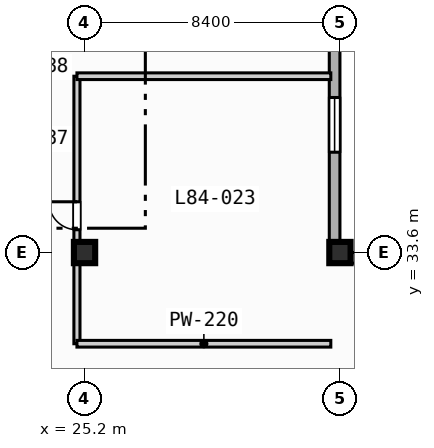
"""IFC4 building model, lengths in metres.
Left out: names, types, materials, properties, quantities, classifications, styles, units other than length and angle.
Written with IfcOpenShell. Run it as: python <this file> out.ifc"""

import sys

from ifc_helpers import new_model, si_unit, direction, frame, frame_2d, origin, origin_2d, place, context, subcontext, project, spatial, rectangle, extrude, element, fill, save


model = new_model("IFC4")
c1 = context("Model", 3, precision=1e-05, world=origin(), true_north=direction((0.0, 1.0)))
c2 = subcontext(c1, "Body", "Model", "MODEL_VIEW")
j1 = project(units=[si_unit("LENGTHUNIT", "METRE"), si_unit("PLANEANGLEUNIT", "RADIAN")], contexts=[c1])
p1 = place(None, origin())
s1 = spatial("IfcSite", under=j1, at=p1, CompositionType="ELEMENT")
p2 = place(p1, origin())
s2 = spatial("IfcBuilding", under=s1, at=p2, CompositionType="ELEMENT")
p3 = place(p2, frame((0.0, 0.0, 339.8)))
s3 = spatial("IfcBuildingStorey", under=s2, at=p3, CompositionType="ELEMENT", Elevation=339.8)
for number, where, z_axis, x_axis in (
    (1, (25.2, 33.6, 0.0), (0.0, 0.0, 1.0), (1.0, 0.0, 0.0)),
    (2, (33.6, 33.6, 0.0), (0.0, 0.0, 1.0), (1.0, 0.0, 0.0)),
):
    element("IfcColumn", number, at=place(p3, frame(where, z_axis=z_axis, x_axis=x_axis)), inside=s3, PredefinedType="COLUMN", context=c2, shape_type="SweptSolid", body=[
        extrude(rectangle(XDim=0.7, YDim=0.7, at=origin_2d()), origin(), (0.0, 0.0, 1.0), 3.9),
    ])
p4 = place(p3, frame((33.425, 72.425, 0.0), z_axis=(0.0, 0.0, 1.0), x_axis=(0.0, -1.0, 0.0)))
e3 = element("IfcWall", 3, at=p4, inside=s3, PredefinedType="STANDARD", context=c2, shape_type="SweptSolid", body=[
    extrude(rectangle(XDim=39.0, YDim=0.35, at=frame_2d((19.5, 0.0))), origin(), (0.0, 0.0, 1.0), 3.67),
])
p5 = place(p4, frame((33.725, 0.0, 0.85)))
e4 = element("IfcOpeningElement", 4, at=p5, cuts=e3, PredefinedType="OPENING", context=c2, shape_type="SweptSolid", body=[
    extrude(rectangle(XDim=1.8, YDim=1.8, at=frame_2d((0.9, 0.9))), frame((0.0, 0.185, 0.0), z_axis=(0.0, -1.0, 0.0), x_axis=(1.0, 0.0, 0.0)), (0.0, 0.0, 1.0), 0.37),
])
p6 = place(p4, frame((8.225, 0.0, 0.85)))
e5 = element("IfcOpeningElement", 5, at=p6, cuts=e3, PredefinedType="OPENING", context=c2, shape_type="SweptSolid", body=[
    extrude(rectangle(XDim=2.4, YDim=1.95, at=frame_2d((1.2, 0.975))), frame((0.0, 0.185, 0.0), z_axis=(0.0, -1.0, 0.0), x_axis=(1.0, 0.0, 0.0)), (0.0, 0.0, 1.0), 0.37),
])
p7 = place(p3, frame((33.425, 33.425, 0.0), z_axis=(0.0, 0.0, 1.0), x_axis=(1.0, 0.0, 0.0)))
e6 = element("IfcWall", 6, at=p7, inside=s3, PredefinedType="STANDARD", context=c2, shape_type="SweptSolid", body=[
    extrude(rectangle(XDim=30.6, YDim=0.35, at=frame_2d((15.3, 0.0))), origin(), (0.0, 0.0, 1.0), 3.67),
])
p8 = place(p7, frame((12.075, 0.0, 0.0)))
e7 = element("IfcOpeningElement", 7, at=p8, cuts=e6, PredefinedType="OPENING", context=c2, shape_type="SweptSolid", body=[
    extrude(rectangle(XDim=1.4, YDim=2.2, at=frame_2d((0.7, 1.1))), frame((0.0, 0.185, 0.0), z_axis=(0.0, -1.0, 0.0), x_axis=(1.0, 0.0, 0.0)), (0.0, 0.0, 1.0), 0.37),
])
p9 = place(p3, frame((24.95, 30.6, 0.0), z_axis=(0.0, 0.0, 1.0), x_axis=(0.0, 1.0, 0.0)))
e8 = element("IfcWall", 8, at=p9, inside=s3, PredefinedType="PARTITIONING", context=c2, shape_type="SweptSolid", body=[
    extrude(rectangle(XDim=8.8, YDim=0.2, at=frame_2d((4.4, 0.0))), origin(), (0.0, 0.0, 1.0), 3.07),
])
p10 = place(p9, frame((3.75, 0.0, 0.0)))
e9 = element("IfcOpeningElement", 9, at=p10, cuts=e8, PredefinedType="OPENING", context=c2, shape_type="SweptSolid", body=[
    extrude(rectangle(XDim=0.92, YDim=2.1, at=frame_2d((0.46, 1.05))), frame((0.0, 0.11, 0.0), z_axis=(0.0, -1.0, 0.0), x_axis=(1.0, 0.0, 0.0)), (0.0, 0.0, 1.0), 0.22),
])
for number, where, z_axis, x_axis in (
    (10, (24.95, 30.6, 0.0), (0.0, 0.0, 1.0), (1.0, 0.0, 0.0)),
    (11, (24.95, 39.4, 0.0), (0.0, 0.0, 1.0), (1.0, 0.0, 0.0)),
):
    element("IfcWall", number, at=place(p3, frame(where, z_axis=z_axis, x_axis=x_axis)), inside=s3, PredefinedType="PARTITIONING", context=c2, shape_type="SweptSolid", body=[
        extrude(rectangle(XDim=8.35, YDim=0.22, at=frame_2d((4.175, 0.0))), origin(), (0.0, 0.0, 1.0), 3.67),
    ])
p11 = place(p5, origin())
e12 = element("IfcWindow", 12, at=p11, inside=s3, PartitioningType="SINGLE_PANEL", PredefinedType="WINDOW", context=c2, shape_type="SweptSolid", body=[
    extrude(rectangle(XDim=1.8, YDim=1.8, at=frame_2d((0.9, 0.9))), frame((0.0, 0.03, 0.0), z_axis=(0.0, -1.0, 0.0), x_axis=(1.0, 0.0, 0.0)), (0.0, 0.0, 1.0), 0.06),
])
fill(e4, e12)
p12 = place(p10, origin())
e13 = element("IfcDoor", 13, at=p12, inside=s3, OperationType="SINGLE_SWING_RIGHT", PredefinedType="DOOR", context=c2, shape_type="SweptSolid", body=[
    extrude(rectangle(XDim=0.92, YDim=2.1, at=frame_2d((0.46, 1.05))), frame((0.0, 0.025, 0.0), z_axis=(0.0, -1.0, 0.0), x_axis=(1.0, 0.0, 0.0)), (0.0, 0.0, 1.0), 0.05),
])
fill(e9, e13)
save(model, sys.argv[1])
